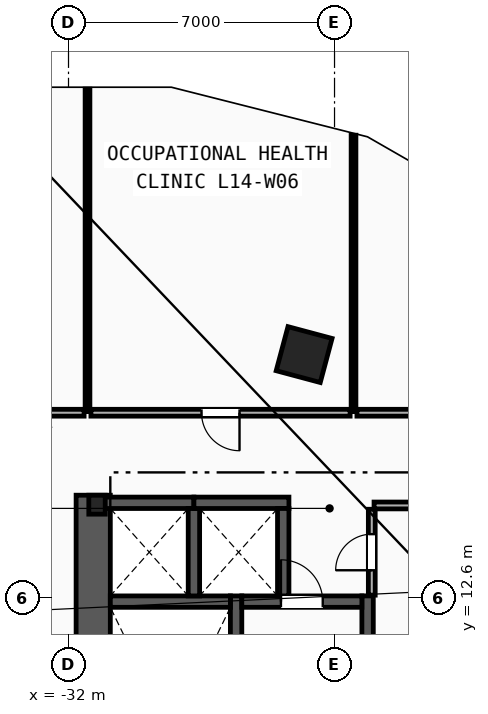
"""IFC4 building model, lengths in metres.
Left out: names, types, materials, properties, quantities, classifications, styles, units other than length and angle.
Written with IfcOpenShell. Run it as: python <this file> out.ifc"""

import sys

from ifc_helpers import new_model, si_unit, direction, frame, frame_2d, origin, origin_2d, place, context, subcontext, project, spatial, rectangle, i_section, extrude, element, fill, save


model = new_model("IFC4")
c1 = context("Model", 3, precision=1e-05, world=origin(), true_north=direction((0.0, 1.0)))
c2 = subcontext(c1, "Body", "Model", "MODEL_VIEW")
j1 = project(units=[si_unit("LENGTHUNIT", "METRE"), si_unit("PLANEANGLEUNIT", "RADIAN")], contexts=[c1])
p1 = place(None, origin())
s1 = spatial("IfcSite", under=j1, at=p1, CompositionType="ELEMENT")
p2 = place(p1, origin())
s2 = spatial("IfcBuilding", under=s1, at=p2, CompositionType="ELEMENT")
p3 = place(p2, frame((0.0, 0.0, 58.2)))
s3 = spatial("IfcBuildingStorey", under=s2, at=p3, CompositionType="ELEMENT", Elevation=58.2)
p4 = place(p3, frame((-31.25, 15.05, 0.0), z_axis=(0.0, 0.0, 1.0), x_axis=(1.0, 0.0, 0.0)))
e1 = element("IfcColumn", 1, at=p4, inside=s3, PredefinedType="COLUMN", context=c2, shape_type="SweptSolid", body=[
    extrude(i_section(OverallWidth=0.432, OverallDepth=0.498, WebThickness=0.056, FlangeThickness=0.089, FilletRadius=0.018, at=origin_2d()), origin(), (0.0, 0.0, 1.0), 3.8),
])
p5 = place(p3, frame((-25.8, 19.0, 0.0), z_axis=(0.0, 0.0, 1.0), x_axis=(-0.965970984022, 0.258650455301, 0.0)))
e2 = element("IfcColumn", 2, at=p5, inside=s3, PredefinedType="COLUMN", context=c2, shape_type="SweptSolid", body=[
    extrude(rectangle(XDim=1.2, YDim=1.2, at=origin_2d()), origin(), (0.0, 0.0, 1.0), 3.8),
])
p6 = place(p3, frame((-31.35, 1.97, 0.0), z_axis=(0.0, 0.0, 1.0), x_axis=(0.0, 1.0, 0.0)))
e3 = element("IfcWall", 3, at=p6, inside=s3, PredefinedType="SHEAR", context=c2, shape_type="SweptSolid", body=[
    extrude(rectangle(XDim=13.33, YDim=0.9, at=frame_2d((6.665, 0.0))), origin(), (0.0, 0.0, 1.0), 3.5),
])
for number, where, z_axis, x_axis in (
    (4, (-27.59, 1.97, 0.0), (0.0, 0.0, 1.0), (0.0, 1.0, 0.0)),
    (5, (-24.13, 1.97, 0.0), (0.0, 0.0, 1.0), (0.0, 1.0, 0.0)),
):
    element("IfcWall", number, at=place(p3, frame(where, z_axis=z_axis, x_axis=x_axis)), inside=s3, PredefinedType="SHEAR", context=c2, shape_type="SweptSolid", body=[
        extrude(rectangle(XDim=10.68, YDim=0.3, at=frame_2d((5.34, 0.0))), origin(), (0.0, 0.0, 1.0), 3.5),
    ])
p7 = place(p3, frame((-30.9, 12.5, 0.0), z_axis=(0.0, 0.0, 1.0), x_axis=(1.0, 0.0, 0.0)))
e6 = element("IfcWall", 6, at=p7, inside=s3, PredefinedType="SHEAR", context=c2, shape_type="SweptSolid", body=[
    extrude(rectangle(XDim=3.16, YDim=0.3, at=frame_2d((1.58, 0.0))), origin(), (0.0, 0.0, 1.0), 3.5),
])
p8 = place(p3, frame((-27.44, 12.5, 0.0), z_axis=(0.0, 0.0, 1.0), x_axis=(1.0, 0.0, 0.0)))
e7 = element("IfcWall", 7, at=p8, inside=s3, PredefinedType="SHEAR", context=c2, shape_type="SweptSolid", body=[
    extrude(rectangle(XDim=3.16, YDim=0.3, at=frame_2d((1.58, 0.0))), origin(), (0.0, 0.0, 1.0), 3.5),
])
p9 = place(p8, frame((1.03, 0.0, 0.0)))
e8 = element("IfcOpeningElement", 8, at=p9, cuts=e7, PredefinedType="OPENING", context=c2, shape_type="SweptSolid", body=[
    extrude(rectangle(XDim=1.1, YDim=2.15, at=frame_2d((0.55, 1.075))), frame((0.0, 0.16, 0.0), z_axis=(0.0, -1.0, 0.0), x_axis=(1.0, 0.0, 0.0)), (0.0, 0.0, 1.0), 0.32),
])
p10 = place(p3, frame((-31.2, 15.1, 0.0), z_axis=(0.0, 0.0, 1.0), x_axis=(1.0, 0.0, 0.0)))
e9 = element("IfcWall", 9, at=p10, inside=s3, PredefinedType="SHEAR", context=c2, shape_type="SweptSolid", body=[
    extrude(rectangle(XDim=2.5, YDim=0.3, at=frame_2d((1.25, 0.0))), origin(), (0.0, 0.0, 1.0), 3.5),
])
p11 = place(p3, frame((-28.7, 12.65, 0.0), z_axis=(0.0, 0.0, 1.0), x_axis=(0.0, 1.0, 0.0)))
e10 = element("IfcWall", 10, at=p11, inside=s3, PredefinedType="SHEAR", context=c2, shape_type="SweptSolid", body=[
    extrude(rectangle(XDim=2.3, YDim=0.3, at=frame_2d((1.15, 0.0))), origin(), (0.0, 0.0, 1.0), 3.5),
])
p12 = place(p3, frame((-28.7, 15.1, 0.0), z_axis=(0.0, 0.0, 1.0), x_axis=(1.0, 0.0, 0.0)))
e11 = element("IfcWall", 11, at=p12, inside=s3, PredefinedType="SHEAR", context=c2, shape_type="SweptSolid", body=[
    extrude(rectangle(XDim=2.5, YDim=0.3, at=frame_2d((1.25, 0.0))), origin(), (0.0, 0.0, 1.0), 3.5),
])
p13 = place(p3, frame((-26.35, 12.65, 0.0), z_axis=(0.0, 0.0, 1.0), x_axis=(0.0, 1.0, 0.0)))
e12 = element("IfcWall", 12, at=p13, inside=s3, PredefinedType="SHEAR", context=c2, shape_type="SweptSolid", body=[
    extrude(rectangle(XDim=2.3, YDim=0.3, at=frame_2d((1.15, 0.0))), origin(), (0.0, 0.0, 1.0), 3.5),
])
p14 = place(p3, frame((-23.96, 15.03, 0.0), z_axis=(0.0, 0.0, 1.0), x_axis=(1.0, 0.0, 0.0)))
e13 = element("IfcWall", 13, at=p14, inside=s3, PredefinedType="PARTITIONING", context=c2, shape_type="SweptSolid", body=[
    extrude(rectangle(XDim=2.61, YDim=0.18, at=frame_2d((1.305, 0.0))), origin(), (0.0, 0.0, 1.0), 2.573),
])
p15 = place(p3, frame((-24.02, 12.67, 0.0), z_axis=(0.0, 0.0, 1.0), x_axis=(0.0, 1.0, 0.0)))
e14 = element("IfcWall", 14, at=p15, inside=s3, PredefinedType="PARTITIONING", context=c2, shape_type="SweptSolid", body=[
    extrude(rectangle(XDim=2.26, YDim=0.18, at=frame_2d((1.13, 0.0))), origin(), (0.0, 0.0, 1.0), 3.5),
])
p16 = place(p15, frame((0.655, 0.0, 0.0)))
e15 = element("IfcOpeningElement", 15, at=p16, cuts=e14, PredefinedType="OPENING", context=c2, shape_type="SweptSolid", body=[
    extrude(rectangle(XDim=0.95, YDim=2.1, at=frame_2d((0.475, 1.05))), frame((0.0, 0.1, 0.0), z_axis=(0.0, -1.0, 0.0), x_axis=(1.0, 0.0, 0.0)), (0.0, 0.0, 1.0), 0.2),
])
p17 = place(p3, frame((-31.5, 17.5, 0.0), z_axis=(0.0, 0.0, 1.0), x_axis=(0.0, 1.0, 0.0)))
e16 = element("IfcWall", 16, at=p17, inside=s3, PredefinedType="PARTITIONING", context=c2, shape_type="SweptSolid", body=[
    extrude(rectangle(XDim=8.485, YDim=0.125, at=frame_2d((4.243, 0.0))), origin(), (0.0, 0.0, 1.0), 3.5),
])
p18 = place(p3, frame((-24.5, 17.5, 0.0), z_axis=(0.0, 0.0, 1.0), x_axis=(0.0, 1.0, 0.0)))
e17 = element("IfcWall", 17, at=p18, inside=s3, PredefinedType="PARTITIONING", context=c2, shape_type="SweptSolid", body=[
    extrude(rectangle(XDim=7.272, YDim=0.125, at=frame_2d((3.636, 0.0))), origin(), (0.0, 0.0, 1.0), 3.5),
])
p19 = place(p3, frame((-16.822, 17.47, 0.0), z_axis=(0.0, 0.0, 1.0), x_axis=(-1.0, 0.0, 0.0)))
e18 = element("IfcWall", 18, at=p19, inside=s3, PredefinedType="PARTITIONING", context=c2, shape_type="SweptSolid", body=[
    extrude(rectangle(XDim=7.588, YDim=0.18, at=frame_2d((3.794, 0.0))), origin(), (0.0, 0.0, 1.0), 3.5),
])
p20 = place(p3, frame((-31.59, 17.47, 0.0), z_axis=(0.0, 0.0, 1.0), x_axis=(-1.0, 0.0, 0.0)))
e19 = element("IfcWall", 19, at=p20, inside=s3, PredefinedType="PARTITIONING", context=c2, shape_type="SweptSolid", body=[
    extrude(rectangle(XDim=2.038, YDim=0.18, at=frame_2d((1.019, 0.0))), origin(), (0.0, 0.0, 1.0), 3.5),
])
p21 = place(p3, frame((-24.59, 17.47, 0.0), z_axis=(0.0, 0.0, 1.0), x_axis=(-1.0, 0.0, 0.0)))
e20 = element("IfcWall", 20, at=p21, inside=s3, PredefinedType="PARTITIONING", context=c2, shape_type="SweptSolid", body=[
    extrude(rectangle(XDim=6.82, YDim=0.18, at=frame_2d((3.41, 0.0))), origin(), (0.0, 0.0, 1.0), 3.5),
])
p22 = place(p21, frame((2.91, 0.0, 0.0)))
e21 = element("IfcOpeningElement", 21, at=p22, cuts=e20, PredefinedType="OPENING", context=c2, shape_type="SweptSolid", body=[
    extrude(rectangle(XDim=1.0, YDim=2.15, at=frame_2d((0.5, 1.075))), frame((0.0, 0.1, 0.0), z_axis=(0.0, -1.0, 0.0), x_axis=(1.0, 0.0, 0.0)), (0.0, 0.0, 1.0), 0.2),
])
p23 = place(p9, origin())
e22 = element("IfcDoor", 22, at=p23, inside=s3, OperationType="SINGLE_SWING_LEFT", PredefinedType="DOOR", context=c2, shape_type="SweptSolid", body=[
    extrude(rectangle(XDim=1.1, YDim=2.15, at=frame_2d((0.55, 1.075))), frame((0.0, 0.025, 0.0), z_axis=(0.0, -1.0, 0.0), x_axis=(1.0, 0.0, 0.0)), (0.0, 0.0, 1.0), 0.05),
])
fill(e8, e22)
p24 = place(p22, origin())
e23 = element("IfcDoor", 23, at=p24, inside=s3, OperationType="SINGLE_SWING_LEFT", PredefinedType="DOOR", context=c2, shape_type="SweptSolid", body=[
    extrude(rectangle(XDim=1.0, YDim=2.15, at=frame_2d((0.5, 1.075))), frame((0.0, 0.025, 0.0), z_axis=(0.0, -1.0, 0.0), x_axis=(1.0, 0.0, 0.0)), (0.0, 0.0, 1.0), 0.05),
])
fill(e21, e23)
p25 = place(p16, origin())
e24 = element("IfcDoor", 24, at=p25, inside=s3, OperationType="SINGLE_SWING_LEFT", PredefinedType="DOOR", context=c2, shape_type="SweptSolid", body=[
    extrude(rectangle(XDim=0.95, YDim=2.1, at=frame_2d((0.475, 1.05))), frame((0.0, 0.025, 0.0), z_axis=(0.0, -1.0, 0.0), x_axis=(1.0, 0.0, 0.0)), (0.0, 0.0, 1.0), 0.05),
])
fill(e15, e24)
save(model, sys.argv[1])
